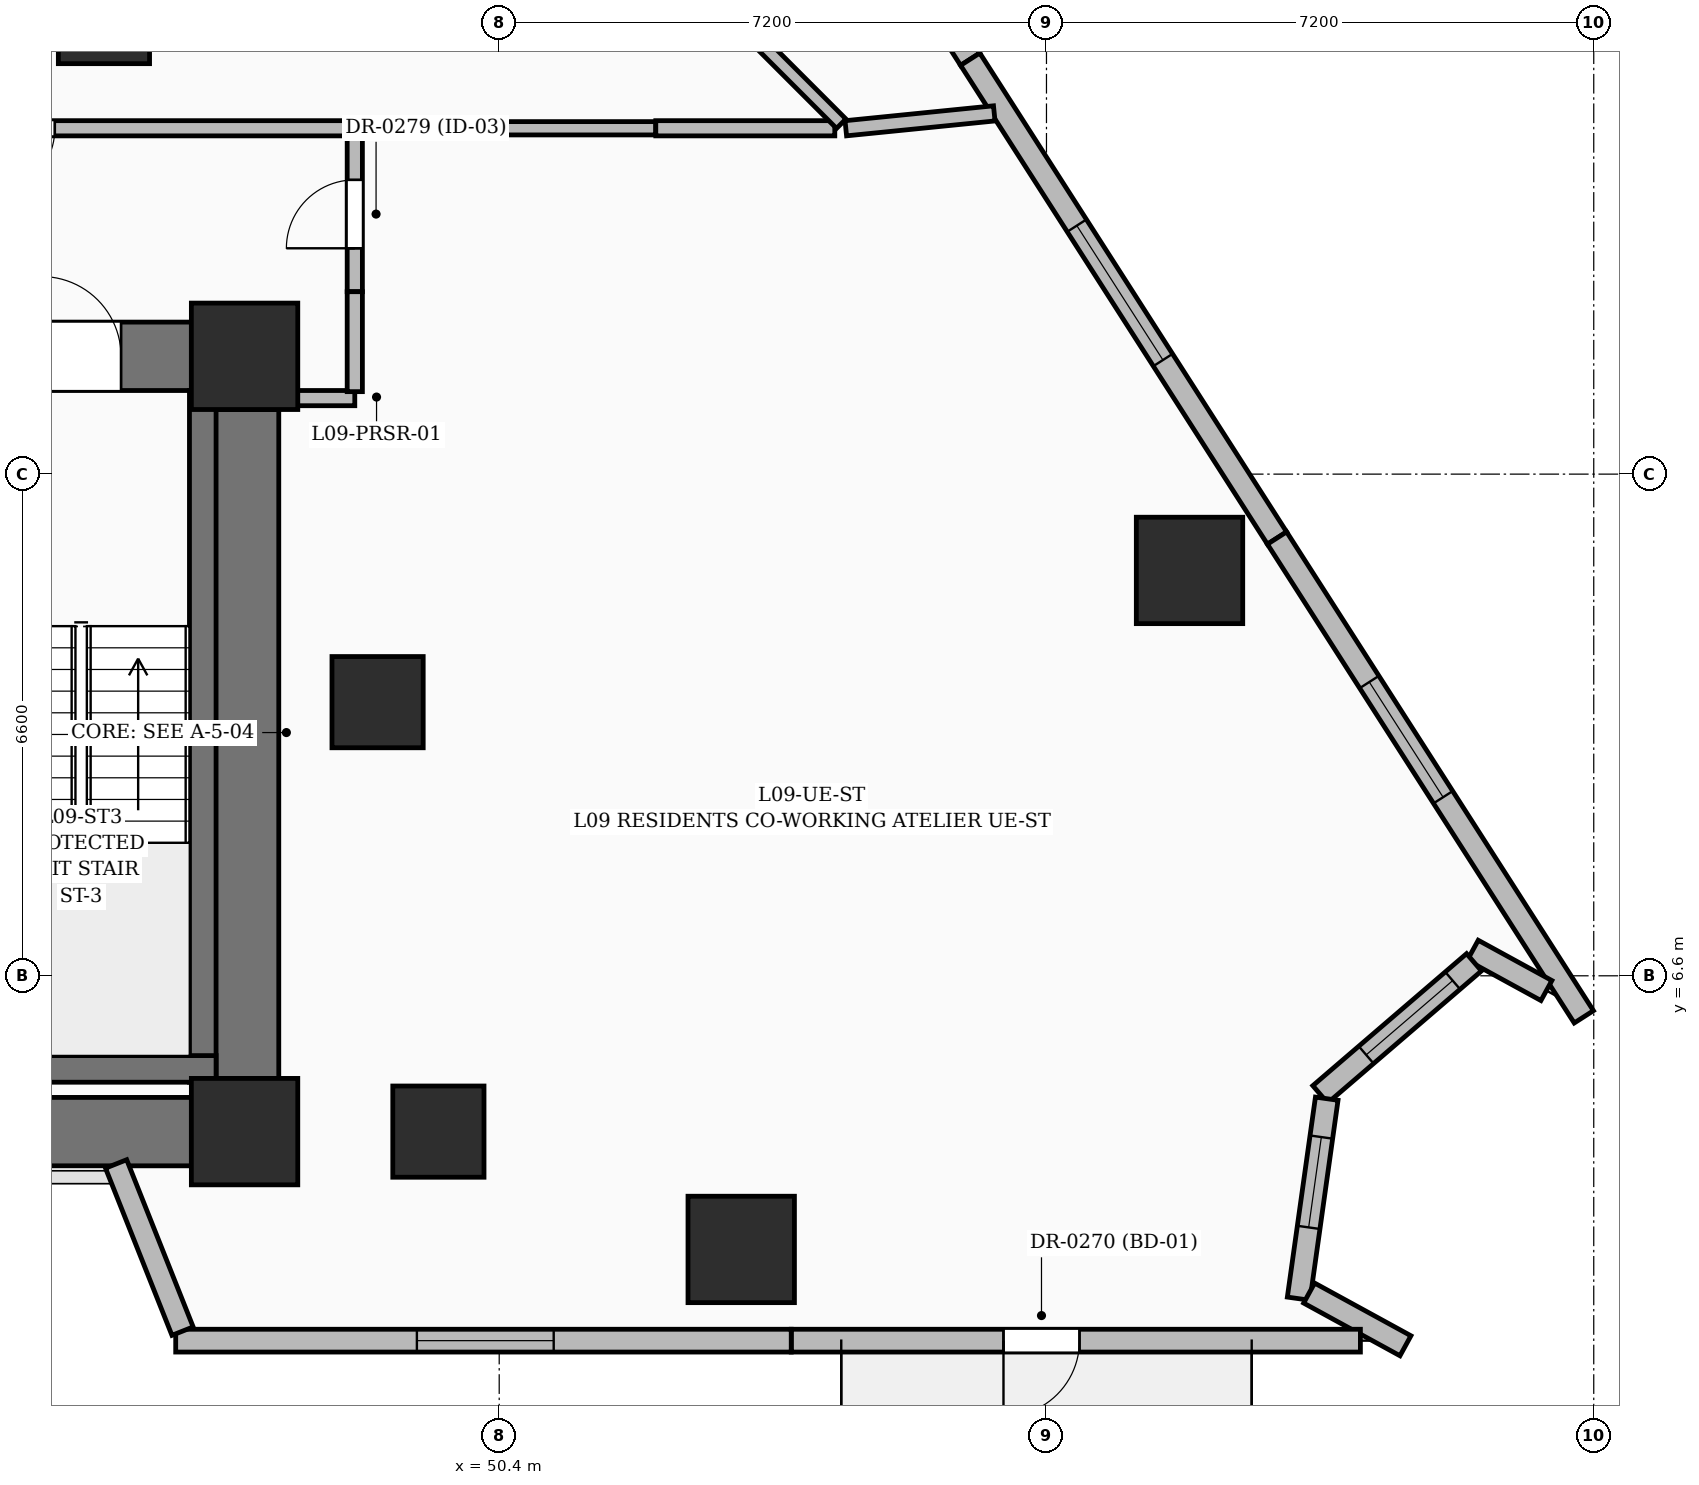
"""IFC4 building model, lengths in metres.
Left out: names, types, materials, properties, quantities, classifications, styles, units other than length and angle.
Written with IfcOpenShell. Run it as: python <this file> out.ifc"""

import sys

from ifc_helpers import new_model, si_unit, direction, frame, frame_2d, origin, origin_2d, place, context, subcontext, project, spatial, rectangle, extrude, element, fill, save


model = new_model("IFC4")
c1 = context("Model", 3, precision=1e-05, world=origin(), true_north=direction((0.0, 1.0)))
c2 = subcontext(c1, "Body", "Model", "MODEL_VIEW")
j1 = project(units=[si_unit("LENGTHUNIT", "METRE"), si_unit("PLANEANGLEUNIT", "RADIAN")], contexts=[c1])
p1 = place(None, origin())
s1 = spatial("IfcSite", under=j1, at=p1, CompositionType="ELEMENT")
p2 = place(p1, origin())
s2 = spatial("IfcBuilding", under=s1, at=p2, CompositionType="ELEMENT")
p3 = place(p2, frame((0.0, 0.0, 42.6)))
s3 = spatial("IfcBuildingStorey", under=s2, at=p3, CompositionType="ELEMENT", Elevation=42.6)
for number, where, z_axis, x_axis in (
    (1, (47.05, 4.55, 0.0), (0.0, 0.0, 1.0), (1.0, 0.0, 0.0)),
    (2, (47.05, 14.75, 0.0), (0.0, 0.0, 1.0), (1.0, 0.0, 0.0)),
):
    element("IfcColumn", number, at=place(p3, frame(where, z_axis=z_axis, x_axis=x_axis)), inside=s3, PredefinedType="COLUMN", context=c2, shape_type="SweptSolid", body=[
        extrude(rectangle(XDim=1.4, YDim=1.4, at=origin_2d()), origin(), (0.0, 0.0, 1.0), 3.6),
    ])
for number, where, z_axis, x_axis in (
    (3, (49.6, 4.55, 0.0), (0.0, 0.0, 1.0), (1.0, 0.0, 0.0)),
    (4, (48.8, 10.2, 0.0), (0.0, 0.0, 1.0), (1.0, 0.0, 0.0)),
    (5, (45.2, 19.2, 0.0), (0.0, 0.0, 1.0), (1.0, 0.0, 0.0)),
):
    element("IfcColumn", number, at=place(p3, frame(where, z_axis=z_axis, x_axis=x_axis)), inside=s3, PredefinedType="COLUMN", context=c2, shape_type="SweptSolid", body=[
        extrude(rectangle(XDim=1.2, YDim=1.2, at=origin_2d()), origin(), (0.0, 0.0, 1.0), 3.6),
    ])
p4 = place(p3, frame((35.85, 4.55, 0.0), z_axis=(0.0, 0.0, 1.0), x_axis=(1.0, 0.0, 0.0)))
e6 = element("IfcWall", 6, at=p4, inside=s3, PredefinedType="SHEAR", context=c2, shape_type="SweptSolid", body=[
    extrude(rectangle(XDim=10.5, YDim=0.9, at=frame_2d((5.25, 0.0))), origin(), (0.0, 0.0, 1.0), 3.6),
])
p5 = place(p3, frame((35.85, 14.75, 0.0), z_axis=(0.0, 0.0, 1.0), x_axis=(1.0, 0.0, 0.0)))
e7 = element("IfcWall", 7, at=p5, inside=s3, PredefinedType="SHEAR", context=c2, shape_type="SweptSolid", body=[
    extrude(rectangle(XDim=10.5, YDim=0.9, at=frame_2d((5.25, 0.0))), origin(), (0.0, 0.0, 1.0), 3.6),
])
p6 = place(p5, frame((0.925, 0.0, 0.0)))
e8 = element("IfcOpeningElement", 8, at=p6, cuts=e7, PredefinedType="OPENING", context=c2, shape_type="SweptSolid", body=[
    extrude(rectangle(XDim=1.05, YDim=2.15, at=frame_2d((0.525, 1.075))), frame((0.0, 0.46, 0.0), z_axis=(0.0, -1.0, 0.0), x_axis=(1.0, 0.0, 0.0)), (0.0, 0.0, 1.0), 0.92),
])
p7 = place(p5, frame((8.525, 0.0, 0.0)))
e9 = element("IfcOpeningElement", 9, at=p7, cuts=e7, PredefinedType="OPENING", context=c2, shape_type="SweptSolid", body=[
    extrude(rectangle(XDim=1.05, YDim=2.15, at=frame_2d((0.525, 1.075))), frame((0.0, 0.46, 0.0), z_axis=(0.0, -1.0, 0.0), x_axis=(1.0, 0.0, 0.0)), (0.0, 0.0, 1.0), 0.92),
])
p8 = place(p3, frame((47.05, 5.25, 0.0), z_axis=(0.0, 0.0, 1.0), x_axis=(0.0, 1.0, 0.0)))
e10 = element("IfcWall", 10, at=p8, inside=s3, PredefinedType="SHEAR", context=c2, shape_type="SweptSolid", body=[
    extrude(rectangle(XDim=8.8, YDim=0.9, at=frame_2d((4.4, 0.0))), origin(), (0.0, 0.0, 1.0), 3.6),
])
p9 = place(p3, frame((46.5, 5.2, 0.0), z_axis=(0.0, 0.0, 1.0), x_axis=(0.0, 1.0, 0.0)))
e11 = element("IfcWall", 11, at=p9, inside=s3, PredefinedType="SOLIDWALL", context=c2, shape_type="SweptSolid", body=[
    extrude(rectangle(XDim=9.1, YDim=0.35, at=frame_2d((4.55, 0.0))), origin(), (0.0, 0.0, 1.0), 3.6),
])
p10 = place(p3, frame((43.125, 5.375, 0.0), z_axis=(0.0, 0.0, 1.0), x_axis=(1.0, 0.0, 0.0)))
e12 = element("IfcWall", 12, at=p10, inside=s3, PredefinedType="SOLIDWALL", context=c2, shape_type="SweptSolid", body=[
    extrude(rectangle(XDim=3.55, YDim=0.35, at=frame_2d((1.775, 0.0))), origin(), (0.0, 0.0, 1.0), 3.6),
])
for number, where, z_axis, x_axis in (
    (13, (53.584, 3.0, 0.0), (0.0, 0.0, 1.0), (1.0, 0.0, 0.0)),
    (14, (59.482, 11.933, 0.0), (0.0, 0.0, 1.0), (1.0, 0.0, 0.0)),
):
    element("IfcColumn", number, at=place(p3, frame(where, z_axis=z_axis, x_axis=x_axis)), inside=s3, PredefinedType="COLUMN", context=c2, shape_type="SweptSolid", body=[
        extrude(rectangle(XDim=1.4, YDim=1.4, at=origin_2d()), origin(), (0.0, 0.0, 1.0), 3.6),
    ])
p11 = place(p3, frame((52.56, 24.958, 0.0), z_axis=(0.0, 0.0, 1.0), x_axis=(0.539510136354, -0.841979104712, 0.0)))
e15 = element("IfcWall", 15, at=p11, inside=s3, PredefinedType="SOLIDWALL", context=c2, shape_type="SweptSolid", body=[
    extrude(rectangle(XDim=7.481, YDim=0.3, at=frame_2d((3.741, 0.0))), origin(), (0.0, 0.0, 1.0), 3.35),
])
p12 = place(p11, frame((2.45, 0.0, 0.6)))
e16 = element("IfcOpeningElement", 16, at=p12, cuts=e15, PredefinedType="OPENING", context=c2, shape_type="SweptSolid", body=[
    extrude(rectangle(XDim=2.4, YDim=2.1, at=frame_2d((1.2, 1.05))), frame((0.0, 0.16, 0.0), z_axis=(0.0, -1.0, 0.0), x_axis=(1.0, 0.0, 0.0)), (0.0, 0.0, 1.0), 0.32),
])
p13 = place(p3, frame((56.596, 18.658, 0.0), z_axis=(0.0, 0.0, 1.0), x_axis=(0.539548093607, -0.841954781853, 0.0)))
e17 = element("IfcWall", 17, at=p13, inside=s3, PredefinedType="SOLIDWALL", context=c2, shape_type="SweptSolid", body=[
    extrude(rectangle(XDim=7.481, YDim=0.3, at=frame_2d((3.741, 0.0))), origin(), (0.0, 0.0, 1.0), 3.35),
])
p14 = place(p13, frame((2.6, 0.0, 0.55)))
e18 = element("IfcOpeningElement", 18, at=p14, cuts=e17, PredefinedType="OPENING", context=c2, shape_type="SweptSolid", body=[
    extrude(rectangle(XDim=2.1, YDim=2.4, at=frame_2d((1.05, 1.2))), frame((0.0, 0.16, 0.0), z_axis=(0.0, -1.0, 0.0), x_axis=(1.0, 0.0, 0.0)), (0.0, 0.0, 1.0), 0.32),
])
p15 = place(p3, frame((60.633, 12.359, 0.0), z_axis=(0.0, 0.0, 1.0), x_axis=(0.539510136354, -0.841979104712, 0.0)))
e19 = element("IfcWall", 19, at=p15, inside=s3, PredefinedType="SOLIDWALL", context=c2, shape_type="SweptSolid", body=[
    extrude(rectangle(XDim=7.481, YDim=0.3, at=frame_2d((3.741, 0.0))), origin(), (0.0, 0.0, 1.0), 3.35),
])
p16 = place(p15, frame((2.25, 0.0, 0.6)))
e20 = element("IfcOpeningElement", 20, at=p16, cuts=e19, PredefinedType="OPENING", context=c2, shape_type="SweptSolid", body=[
    extrude(rectangle(XDim=1.8, YDim=2.1, at=frame_2d((0.9, 1.05))), frame((0.0, 0.16, 0.0), z_axis=(0.0, -1.0, 0.0), x_axis=(1.0, 0.0, 0.0)), (0.0, 0.0, 1.0), 0.32),
])
p17 = place(p3, frame((64.177, 6.406, 0.0), z_axis=(0.0, 0.0, 1.0), x_axis=(-0.877235899632, 0.480059555052, 0.0)))
e21 = element("IfcWall", 21, at=p17, inside=s3, PredefinedType="SOLIDWALL", context=c2, shape_type="SweptSolid", body=[
    extrude(rectangle(XDim=1.104, YDim=0.3, at=frame_2d((0.552, 0.0))), origin(), (0.0, 0.0, 1.0), 3.35),
])
p18 = place(p3, frame((63.225, 6.778, 0.0), z_axis=(0.0, 0.0, 1.0), x_axis=(-0.758681082232, -0.651462213381, 0.0)))
e22 = element("IfcWall", 22, at=p18, inside=s3, PredefinedType="SOLIDWALL", context=c2, shape_type="SweptSolid", body=[
    extrude(rectangle(XDim=2.667, YDim=0.3, at=frame_2d((1.333, 0.0))), origin(), (0.0, 0.0, 1.0), 3.35),
])
p19 = place(p18, frame((0.37, 0.0, 0.6)))
e23 = element("IfcOpeningElement", 23, at=p19, cuts=e22, PredefinedType="OPENING", context=c2, shape_type="SweptSolid", body=[
    extrude(rectangle(XDim=1.5, YDim=2.1, at=frame_2d((0.75, 1.05))), frame((0.0, 0.16, 0.0), z_axis=(0.0, -1.0, 0.0), x_axis=(1.0, 0.0, 0.0)), (0.0, 0.0, 1.0), 0.32),
])
p20 = place(p3, frame((61.287, 4.983, 0.0), z_axis=(0.0, 0.0, 1.0), x_axis=(-0.139118263158, -0.990275774144, 0.0)))
e24 = element("IfcWall", 24, at=p20, inside=s3, PredefinedType="SOLIDWALL", context=c2, shape_type="SweptSolid", body=[
    extrude(rectangle(XDim=2.657, YDim=0.3, at=frame_2d((1.329, 0.0))), origin(), (0.0, 0.0, 1.0), 3.35),
])
p21 = place(p20, frame((0.51, 0.0, 0.8)))
e25 = element("IfcOpeningElement", 25, at=p21, cuts=e24, PredefinedType="OPENING", context=c2, shape_type="SweptSolid", body=[
    extrude(rectangle(XDim=1.2, YDim=1.8, at=frame_2d((0.6, 0.9))), frame((0.0, 0.16, 0.0), z_axis=(0.0, -1.0, 0.0), x_axis=(1.0, 0.0, 0.0)), (0.0, 0.0, 1.0), 0.32),
])
p22 = place(p3, frame((61.055, 2.426, 0.0), z_axis=(0.0, 0.0, 1.0), x_axis=(0.877287752989, -0.479964788767, 0.0)))
e26 = element("IfcWall", 26, at=p22, inside=s3, PredefinedType="SOLIDWALL", context=c2, shape_type="SweptSolid", body=[
    extrude(rectangle(XDim=1.445, YDim=0.3, at=frame_2d((0.722, 0.0))), origin(), (0.0, 0.0, 1.0), 3.35),
])
p23 = place(p3, frame((61.73, 1.8, 0.0), z_axis=(0.0, 0.0, 1.0), x_axis=(-1.0, 0.0, 0.0)))
e27 = element("IfcWall", 27, at=p23, inside=s3, PredefinedType="SOLIDWALL", context=c2, shape_type="SweptSolid", body=[
    extrude(rectangle(XDim=7.488, YDim=0.3, at=frame_2d((3.744, 0.0))), origin(), (0.0, 0.0, 1.0), 3.35),
])
p24 = place(p23, frame((3.696, 0.0, 0.0)))
e28 = element("IfcOpeningElement", 28, at=p24, cuts=e27, PredefinedType="OPENING", context=c2, shape_type="SweptSolid", body=[
    extrude(rectangle(XDim=1.0, YDim=2.2, at=frame_2d((0.5, 1.1))), frame((0.0, 0.16, 0.0), z_axis=(0.0, -1.0, 0.0), x_axis=(1.0, 0.0, 0.0)), (0.0, 0.0, 1.0), 0.32),
])
p25 = place(p3, frame((54.242, 1.8, 0.0), z_axis=(0.0, 0.0, 1.0), x_axis=(-1.0, 0.0, 0.0)))
e29 = element("IfcWall", 29, at=p25, inside=s3, PredefinedType="SOLIDWALL", context=c2, shape_type="SweptSolid", body=[
    extrude(rectangle(XDim=8.098, YDim=0.3, at=frame_2d((4.049, 0.0))), origin(), (0.0, 0.0, 1.0), 3.35),
])
p26 = place(p25, frame((3.125, 0.0, 0.6)))
e30 = element("IfcOpeningElement", 30, at=p26, cuts=e29, PredefinedType="OPENING", context=c2, shape_type="SweptSolid", body=[
    extrude(rectangle(XDim=1.8, YDim=2.1, at=frame_2d((0.9, 1.05))), frame((0.0, 0.16, 0.0), z_axis=(0.0, -1.0, 0.0), x_axis=(1.0, 0.0, 0.0)), (0.0, 0.0, 1.0), 0.32),
])
p27 = place(p3, frame((46.234, 1.925, 0.0), z_axis=(0.0, 0.0, 1.0), x_axis=(-0.36946923074, 0.92924296475, 0.0)))
e31 = element("IfcWall", 31, at=p27, inside=s3, PredefinedType="SOLIDWALL", context=c2, shape_type="SweptSolid", body=[
    extrude(rectangle(XDim=2.367, YDim=0.3, at=frame_2d((1.184, 0.0))), origin(), (0.0, 0.0, 1.0), 2.375),
])
p28 = place(p3, frame((47.5, 14.2, 0.0), z_axis=(0.0, 0.0, 1.0), x_axis=(1.0, 0.0, 0.0)))
e32 = element("IfcWall", 32, at=p28, inside=s3, PredefinedType="PARTITIONING", context=c2, shape_type="SweptSolid", body=[
    extrude(rectangle(XDim=1.0, YDim=0.2, at=frame_2d((0.5, 0.0))), origin(), (0.0, 0.0, 1.0), 3.35),
])
p29 = place(p3, frame((48.5, 15.6, 0.0), z_axis=(0.0, 0.0, 1.0), x_axis=(0.0, 1.0, 0.0)))
e33 = element("IfcWall", 33, at=p29, inside=s3, PredefinedType="PARTITIONING", context=c2, shape_type="SweptSolid", body=[
    extrude(rectangle(XDim=2.15, YDim=0.2, at=frame_2d((1.075, 0.0))), origin(), (0.0, 0.0, 1.0), 2.279),
])
p30 = place(p29, frame((0.571, 0.0, 0.0)))
e34 = element("IfcOpeningElement", 34, at=p30, cuts=e33, PredefinedType="OPENING", context=c2, shape_type="SweptSolid", body=[
    extrude(rectangle(XDim=0.9, YDim=2.1, at=frame_2d((0.45, 1.05))), frame((0.0, 0.11, 0.0), z_axis=(0.0, -1.0, 0.0), x_axis=(1.0, 0.0, 0.0)), (0.0, 0.0, 1.0), 0.22),
])
p31 = place(p3, frame((48.415, 17.75, 0.0), z_axis=(0.0, 0.0, 1.0), x_axis=(-1.0, 0.0, 0.0)))
e35 = element("IfcWall", 35, at=p31, inside=s3, PredefinedType="PARTITIONING", context=c2, shape_type="SweptSolid", body=[
    extrude(rectangle(XDim=6.685, YDim=0.2, at=frame_2d((3.343, 0.0))), origin(), (0.0, 0.0, 1.0), 2.309),
])
p32 = place(p31, frame((3.861, 0.0, 0.0)))
e36 = element("IfcOpeningElement", 36, at=p32, cuts=e35, PredefinedType="OPENING", context=c2, shape_type="SweptSolid", body=[
    extrude(rectangle(XDim=0.9, YDim=2.1, at=frame_2d((0.45, 1.05))), frame((0.0, 0.11, 0.0), z_axis=(0.0, -1.0, 0.0), x_axis=(1.0, 0.0, 0.0)), (0.0, 0.0, 1.0), 0.22),
])
p33 = place(p3, frame((52.46, 17.75, 0.0), z_axis=(0.0, 0.0, 1.0), x_axis=(-1.0, 0.0, 0.0)))
e37 = element("IfcWall", 37, at=p33, inside=s3, PredefinedType="PARTITIONING", context=c2, shape_type="SweptSolid", body=[
    extrude(rectangle(XDim=3.875, YDim=0.175, at=frame_2d((1.938, 0.0))), origin(), (0.0, 0.0, 1.0), 2.279),
])
p34 = place(p3, frame((54.815, 17.75, 0.0), z_axis=(0.0, 0.0, 1.0), x_axis=(-1.0, 0.0, 0.0)))
e38 = element("IfcWall", 38, at=p34, inside=s3, PredefinedType="PARTITIONING", context=c2, shape_type="SweptSolid", body=[
    extrude(rectangle(XDim=2.355, YDim=0.2, at=frame_2d((1.177, 0.0))), origin(), (0.0, 0.0, 1.0), 2.787),
])
p35 = place(p3, frame((56.913, 17.946, 0.0), z_axis=(0.0, 0.0, 1.0), x_axis=(-0.995000178554, -0.099873142922, 0.0)))
e39 = element("IfcWall", 39, at=p35, inside=s3, PredefinedType="PARTITIONING", context=c2, shape_type="SweptSolid", body=[
    extrude(rectangle(XDim=1.963, YDim=0.2, at=frame_2d((0.981, 0.0))), origin(), (0.0, 0.0, 1.0), 2.37),
])
p36 = place(p3, frame((54.9, 17.81, 0.0), z_axis=(0.0, 0.0, 1.0), x_axis=(-0.707106781187, 0.707106781187, 0.0)))
e40 = element("IfcWall", 40, at=p36, inside=s3, PredefinedType="PARTITIONING", context=c2, shape_type="SweptSolid", body=[
    extrude(rectangle(XDim=16.983, YDim=0.175, at=frame_2d((8.491, 0.0))), origin(), (0.0, 0.0, 1.0), 2.279),
])
p37 = place(p3, frame((48.5, 14.285, 0.0), z_axis=(0.0, 0.0, 1.0), x_axis=(0.0, 1.0, 0.0)))
e41 = element("IfcWall", 41, at=p37, inside=s3, PredefinedType="PARTITIONING", context=c2, shape_type="SweptSolid", body=[
    extrude(rectangle(XDim=1.315, YDim=0.2, at=frame_2d((0.658, 0.0))), origin(), (0.0, 0.0, 1.0), 3.35),
])
p38 = place(p14, origin())
e42 = element("IfcWindow", 42, at=p38, inside=s3, PartitioningType="SINGLE_PANEL", PredefinedType="WINDOW", context=c2, shape_type="SweptSolid", body=[
    extrude(rectangle(XDim=2.1, YDim=2.4, at=frame_2d((1.05, 1.2))), frame((0.0, 0.03, 0.0), z_axis=(0.0, -1.0, 0.0), x_axis=(1.0, 0.0, 0.0)), (0.0, 0.0, 1.0), 0.06),
])
fill(e18, e42)
p39 = place(p16, origin())
e43 = element("IfcWindow", 43, at=p39, inside=s3, PartitioningType="SINGLE_PANEL", PredefinedType="WINDOW", context=c2, shape_type="SweptSolid", body=[
    extrude(rectangle(XDim=1.8, YDim=2.1, at=frame_2d((0.9, 1.05))), frame((0.0, 0.03, 0.0), z_axis=(0.0, -1.0, 0.0), x_axis=(1.0, 0.0, 0.0)), (0.0, 0.0, 1.0), 0.06),
])
fill(e20, e43)
p40 = place(p19, origin())
e44 = element("IfcWindow", 44, at=p40, inside=s3, PartitioningType="SINGLE_PANEL", PredefinedType="WINDOW", context=c2, shape_type="SweptSolid", body=[
    extrude(rectangle(XDim=1.5, YDim=2.1, at=frame_2d((0.75, 1.05))), frame((0.0, 0.03, 0.0), z_axis=(0.0, -1.0, 0.0), x_axis=(1.0, 0.0, 0.0)), (0.0, 0.0, 1.0), 0.06),
])
fill(e23, e44)
p41 = place(p21, origin())
e45 = element("IfcWindow", 45, at=p41, inside=s3, PartitioningType="SINGLE_PANEL", PredefinedType="WINDOW", context=c2, shape_type="SweptSolid", body=[
    extrude(rectangle(XDim=1.2, YDim=1.8, at=frame_2d((0.6, 0.9))), frame((0.0, 0.03, 0.0), z_axis=(0.0, -1.0, 0.0), x_axis=(1.0, 0.0, 0.0)), (0.0, 0.0, 1.0), 0.06),
])
fill(e25, e45)
p42 = place(p24, origin())
e46 = element("IfcDoor", 46, at=p42, inside=s3, OperationType="SINGLE_SWING_RIGHT", PredefinedType="DOOR", context=c2, shape_type="SweptSolid", body=[
    extrude(rectangle(XDim=1.0, YDim=2.2, at=frame_2d((0.5, 1.1))), frame((0.0, 0.025, 0.0), z_axis=(0.0, -1.0, 0.0), x_axis=(1.0, 0.0, 0.0)), (0.0, 0.0, 1.0), 0.05),
])
fill(e28, e46)
p43 = place(p26, origin())
e47 = element("IfcWindow", 47, at=p43, inside=s3, PartitioningType="SINGLE_PANEL", PredefinedType="WINDOW", context=c2, shape_type="SweptSolid", body=[
    extrude(rectangle(XDim=1.8, YDim=2.1, at=frame_2d((0.9, 1.05))), frame((0.0, 0.03, 0.0), z_axis=(0.0, -1.0, 0.0), x_axis=(1.0, 0.0, 0.0)), (0.0, 0.0, 1.0), 0.06),
])
fill(e30, e47)
p44 = place(p7, origin())
e48 = element("IfcDoor", 48, at=p44, inside=s3, OperationType="SINGLE_SWING_LEFT", PredefinedType="DOOR", context=c2, shape_type="SweptSolid", body=[
    extrude(rectangle(XDim=1.05, YDim=2.15, at=frame_2d((0.525, 1.075))), frame((0.0, 0.025, 0.0), z_axis=(0.0, -1.0, 0.0), x_axis=(1.0, 0.0, 0.0)), (0.0, 0.0, 1.0), 0.05),
])
fill(e9, e48)
p45 = place(p32, origin())
e49 = element("IfcDoor", 49, at=p45, inside=s3, OperationType="SINGLE_SWING_RIGHT", PredefinedType="DOOR", context=c2, shape_type="SweptSolid", body=[
    extrude(rectangle(XDim=0.9, YDim=2.1, at=frame_2d((0.45, 1.05))), frame((0.0, 0.025, 0.0), z_axis=(0.0, -1.0, 0.0), x_axis=(1.0, 0.0, 0.0)), (0.0, 0.0, 1.0), 0.05),
])
fill(e36, e49)
p46 = place(p30, origin())
e50 = element("IfcDoor", 50, at=p46, inside=s3, OperationType="SINGLE_SWING_LEFT", PredefinedType="DOOR", context=c2, shape_type="SweptSolid", body=[
    extrude(rectangle(XDim=0.9, YDim=2.1, at=frame_2d((0.45, 1.05))), frame((0.0, 0.025, 0.0), z_axis=(0.0, -1.0, 0.0), x_axis=(1.0, 0.0, 0.0)), (0.0, 0.0, 1.0), 0.05),
])
fill(e34, e50)
save(model, sys.argv[1])
